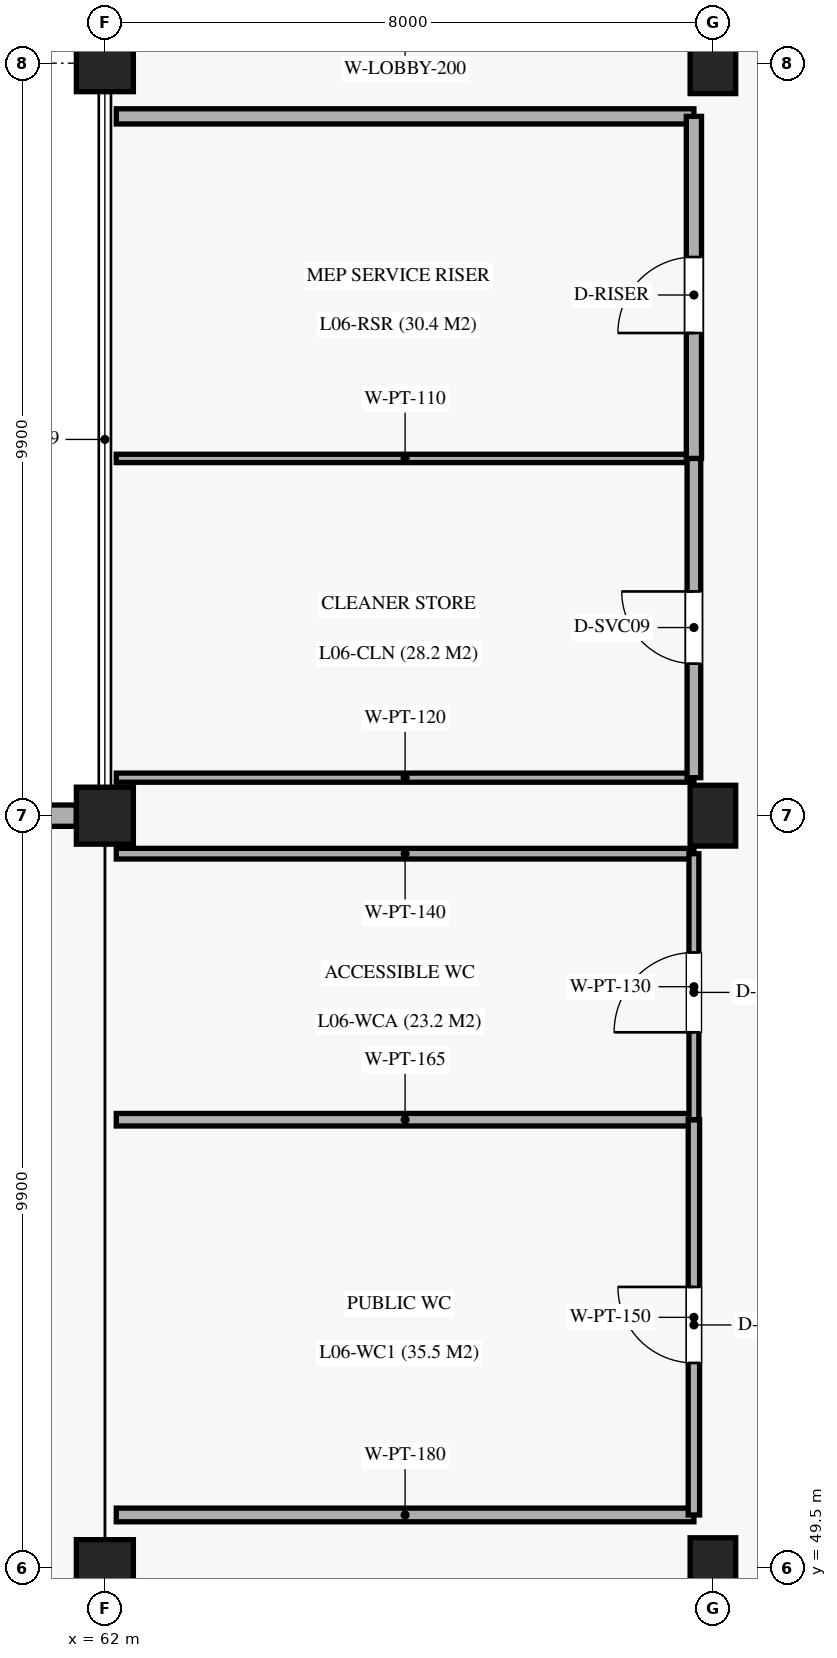
"""IFC4 building model, lengths in metres.
Left out: names, types, materials, properties, quantities, classifications, styles, units other than length and angle.
Written with IfcOpenShell. Run it as: python <this file> out.ifc"""

import sys

from ifc_helpers import new_model, si_unit, direction, frame, frame_2d, origin, origin_2d, place, context, subcontext, project, spatial, rectangle, extrude, element, fill, save


model = new_model("IFC4")
c1 = context("Model", 3, precision=1e-05, world=origin(), true_north=direction((0.0, 1.0)))
c2 = subcontext(c1, "Body", "Model", "MODEL_VIEW")
j1 = project(units=[si_unit("LENGTHUNIT", "METRE"), si_unit("PLANEANGLEUNIT", "RADIAN")], contexts=[c1])
p1 = place(None, origin())
s1 = spatial("IfcSite", under=j1, at=p1, CompositionType="ELEMENT")
p2 = place(p1, origin())
s2 = spatial("IfcBuilding", under=s1, at=p2, CompositionType="ELEMENT")
p3 = place(p2, frame((0.0, 0.0, 33.15)))
s3 = spatial("IfcBuildingStorey", under=s2, at=p3, CompositionType="ELEMENT", Elevation=33.15)
for number, where, z_axis, x_axis in (
    (1, (62.0, 49.5, 0.0), (0.0, 0.0, 1.0), (1.0, 0.0, 0.0)),
    (2, (62.0, 59.4, 0.0), (0.0, 0.0, 1.0), (1.0, 0.0, 0.0)),
    (3, (62.0, 69.3, 0.0), (0.0, 0.0, 1.0), (1.0, 0.0, 0.0)),
):
    element("IfcColumn", number, at=place(p3, frame(where, z_axis=z_axis, x_axis=x_axis)), inside=s3, PredefinedType="COLUMN", context=c2, shape_type="SweptSolid", body=[
        extrude(rectangle(XDim=0.75, YDim=0.75, at=origin_2d()), origin(), (0.0, 0.0, 1.0), 4.59),
    ])
for number, where, z_axis, x_axis in (
    (4, (70.0, 49.5, 0.0), (0.0, 0.0, 1.0), (1.0, 0.0, 0.0)),
    (5, (70.0, 59.4, 0.0), (0.0, 0.0, 1.0), (1.0, 0.0, 0.0)),
    (6, (70.0, 69.3, 0.0), (0.0, 0.0, 1.0), (1.0, 0.0, 0.0)),
):
    element("IfcColumn", number, at=place(p3, frame(where, z_axis=z_axis, x_axis=x_axis)), inside=s3, PredefinedType="COLUMN", context=c2, shape_type="SweptSolid", body=[
        extrude(rectangle(XDim=0.6, YDim=0.8, at=origin_2d()), origin(), (0.0, 0.0, 1.0), 4.59),
    ])
p4 = place(p3, frame((61.625, 59.4, 0.0), z_axis=(0.0, 0.0, 1.0), x_axis=(-1.0, 0.0, 0.0)))
e7 = element("IfcWall", 7, at=p4, inside=s3, PredefinedType="SOLIDWALL", context=c2, shape_type="SweptSolid", body=[
    extrude(rectangle(XDim=3.525, YDim=0.28, at=frame_2d((1.762, 0.0))), origin(), (0.0, 0.0, 1.0), 3.57),
])
p5 = place(p3, frame((62.15, 50.2, 0.0), z_axis=(0.0, 0.0, 1.0), x_axis=(1.0, 0.0, 0.0)))
e8 = element("IfcWall", 8, at=p5, inside=s3, PredefinedType="PARTITIONING", context=c2, shape_type="SweptSolid", body=[
    extrude(rectangle(XDim=7.6, YDim=0.18, at=frame_2d((3.8, 0.0))), origin(), (0.0, 0.0, 1.0), 3.47),
])
p6 = place(p3, frame((62.15, 55.4, 0.0), z_axis=(0.0, 0.0, 1.0), x_axis=(1.0, 0.0, 0.0)))
e9 = element("IfcWall", 9, at=p6, inside=s3, PredefinedType="PARTITIONING", context=c2, shape_type="SweptSolid", body=[
    extrude(rectangle(XDim=7.6, YDim=0.165, at=frame_2d((3.8, 0.0))), origin(), (0.0, 0.0, 1.0), 3.47),
])
p7 = place(p3, frame((69.75, 50.2, 0.0), z_axis=(0.0, 0.0, 1.0), x_axis=(0.0, 1.0, 0.0)))
e10 = element("IfcWall", 10, at=p7, inside=s3, PredefinedType="PARTITIONING", context=c2, shape_type="SweptSolid", body=[
    extrude(rectangle(XDim=5.2, YDim=0.15, at=frame_2d((2.6, 0.0))), origin(), (0.0, 0.0, 1.0), 3.47),
])
p8 = place(p7, frame((2.0, 0.0, 0.0)))
e11 = element("IfcOpeningElement", 11, at=p8, cuts=e10, PredefinedType="OPENING", context=c2, shape_type="SweptSolid", body=[
    extrude(rectangle(XDim=1.0, YDim=2.1, at=frame_2d((0.5, 1.05))), frame((0.0, 0.085, 0.0), z_axis=(0.0, -1.0, 0.0), x_axis=(1.0, 0.0, 0.0)), (0.0, 0.0, 1.0), 0.17),
])
p9 = place(p3, frame((62.15, 58.9, 0.0), z_axis=(0.0, 0.0, 1.0), x_axis=(1.0, 0.0, 0.0)))
e12 = element("IfcWall", 12, at=p9, inside=s3, PredefinedType="PARTITIONING", context=c2, shape_type="SweptSolid", body=[
    extrude(rectangle(XDim=7.6, YDim=0.14, at=frame_2d((3.8, 0.0))), origin(), (0.0, 0.0, 1.0), 3.47),
])
p10 = place(p3, frame((69.75, 55.4, 0.0), z_axis=(0.0, 0.0, 1.0), x_axis=(0.0, 1.0, 0.0)))
e13 = element("IfcWall", 13, at=p10, inside=s3, PredefinedType="PARTITIONING", context=c2, shape_type="SweptSolid", body=[
    extrude(rectangle(XDim=3.5, YDim=0.13, at=frame_2d((1.75, 0.0))), origin(), (0.0, 0.0, 1.0), 3.47),
])
p11 = place(p10, frame((1.15, 0.0, 0.0)))
e14 = element("IfcOpeningElement", 14, at=p11, cuts=e13, PredefinedType="OPENING", context=c2, shape_type="SweptSolid", body=[
    extrude(rectangle(XDim=1.05, YDim=2.15, at=frame_2d((0.525, 1.075))), frame((0.0, 0.075, 0.0), z_axis=(0.0, -1.0, 0.0), x_axis=(1.0, 0.0, 0.0)), (0.0, 0.0, 1.0), 0.15),
])
p12 = place(p3, frame((62.15, 59.9, 0.0), z_axis=(0.0, 0.0, 1.0), x_axis=(1.0, 0.0, 0.0)))
e15 = element("IfcWall", 15, at=p12, inside=s3, PredefinedType="PARTITIONING", context=c2, shape_type="SweptSolid", body=[
    extrude(rectangle(XDim=7.6, YDim=0.12, at=frame_2d((3.8, 0.0))), origin(), (0.0, 0.0, 1.0), 3.47),
])
p13 = place(p3, frame((62.15, 64.1, 0.0), z_axis=(0.0, 0.0, 1.0), x_axis=(1.0, 0.0, 0.0)))
e16 = element("IfcWall", 16, at=p13, inside=s3, PredefinedType="PARTITIONING", context=c2, shape_type="SweptSolid", body=[
    extrude(rectangle(XDim=7.6, YDim=0.11, at=frame_2d((3.8, 0.0))), origin(), (0.0, 0.0, 1.0), 3.47),
])
p14 = place(p3, frame((69.75, 59.9, 0.0), z_axis=(0.0, 0.0, 1.0), x_axis=(0.0, 1.0, 0.0)))
e17 = element("IfcWall", 17, at=p14, inside=s3, PredefinedType="PARTITIONING", context=c2, shape_type="SweptSolid", body=[
    extrude(rectangle(XDim=4.2, YDim=0.18, at=frame_2d((2.1, 0.0))), origin(), (0.0, 0.0, 1.0), 3.47),
])
p15 = place(p14, frame((1.5, 0.0, 0.0)))
e18 = element("IfcOpeningElement", 18, at=p15, cuts=e17, PredefinedType="OPENING", context=c2, shape_type="SweptSolid", body=[
    extrude(rectangle(XDim=0.95, YDim=2.1, at=frame_2d((0.475, 1.05))), frame((0.0, 0.1, 0.0), z_axis=(0.0, -1.0, 0.0), x_axis=(1.0, 0.0, 0.0)), (0.0, 0.0, 1.0), 0.2),
])
p16 = place(p3, frame((62.15, 68.6, 0.0), z_axis=(0.0, 0.0, 1.0), x_axis=(1.0, 0.0, 0.0)))
e19 = element("IfcWall", 19, at=p16, inside=s3, PredefinedType="SOLIDWALL", context=c2, shape_type="SweptSolid", body=[
    extrude(rectangle(XDim=7.6, YDim=0.2, at=frame_2d((3.8, 0.0))), origin(), (0.0, 0.0, 1.0), 3.47),
])
p17 = place(p3, frame((69.75, 64.1, 0.0), z_axis=(0.0, 0.0, 1.0), x_axis=(0.0, 1.0, 0.0)))
e20 = element("IfcWall", 20, at=p17, inside=s3, PredefinedType="SOLIDWALL", context=c2, shape_type="SweptSolid", body=[
    extrude(rectangle(XDim=4.5, YDim=0.2, at=frame_2d((2.25, 0.0))), origin(), (0.0, 0.0, 1.0), 3.47),
])
p18 = place(p17, frame((1.65, 0.0, 0.0)))
e21 = element("IfcOpeningElement", 21, at=p18, cuts=e20, PredefinedType="OPENING", context=c2, shape_type="SweptSolid", body=[
    extrude(rectangle(XDim=1.0, YDim=2.15, at=frame_2d((0.5, 1.075))), frame((0.0, 0.11, 0.0), z_axis=(0.0, -1.0, 0.0), x_axis=(1.0, 0.0, 0.0)), (0.0, 0.0, 1.0), 0.22),
])
p19 = place(p8, origin())
e22 = element("IfcDoor", 22, at=p19, inside=s3, OperationType="SINGLE_SWING_RIGHT", PredefinedType="DOOR", context=c2, shape_type="SweptSolid", body=[
    extrude(rectangle(XDim=1.0, YDim=2.1, at=frame_2d((0.5, 1.05))), frame((0.0, 0.025, 0.0), z_axis=(0.0, -1.0, 0.0), x_axis=(1.0, 0.0, 0.0)), (0.0, 0.0, 1.0), 0.05),
])
fill(e11, e22)
p20 = place(p11, origin())
e23 = element("IfcDoor", 23, at=p20, inside=s3, OperationType="SINGLE_SWING_LEFT", PredefinedType="DOOR", context=c2, shape_type="SweptSolid", body=[
    extrude(rectangle(XDim=1.05, YDim=2.15, at=frame_2d((0.525, 1.075))), frame((0.0, 0.025, 0.0), z_axis=(0.0, -1.0, 0.0), x_axis=(1.0, 0.0, 0.0)), (0.0, 0.0, 1.0), 0.05),
])
fill(e14, e23)
p21 = place(p15, origin())
e24 = element("IfcDoor", 24, at=p21, inside=s3, OperationType="SINGLE_SWING_RIGHT", PredefinedType="DOOR", context=c2, shape_type="SweptSolid", body=[
    extrude(rectangle(XDim=0.95, YDim=2.1, at=frame_2d((0.475, 1.05))), frame((0.0, 0.025, 0.0), z_axis=(0.0, -1.0, 0.0), x_axis=(1.0, 0.0, 0.0)), (0.0, 0.0, 1.0), 0.05),
])
fill(e18, e24)
p22 = place(p18, origin())
e25 = element("IfcDoor", 25, at=p22, inside=s3, OperationType="SINGLE_SWING_LEFT", PredefinedType="DOOR", context=c2, shape_type="SweptSolid", body=[
    extrude(rectangle(XDim=1.0, YDim=2.15, at=frame_2d((0.5, 1.075))), frame((0.0, 0.025, 0.0), z_axis=(0.0, -1.0, 0.0), x_axis=(1.0, 0.0, 0.0)), (0.0, 0.0, 1.0), 0.05),
])
fill(e21, e25)
save(model, sys.argv[1])
